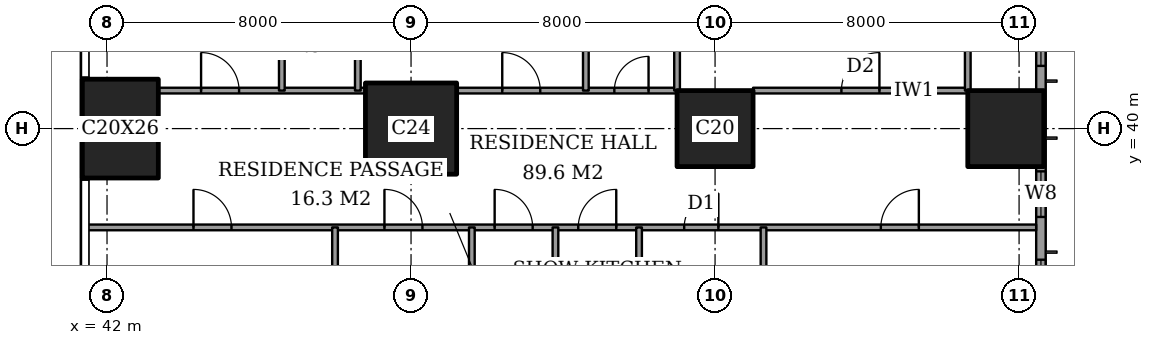
"""IFC4 building model, lengths in metres.
Left out: names, types, materials, properties, quantities, classifications, styles, units other than length and angle.
Written with IfcOpenShell. Run it as: python <this file> out.ifc"""

import sys

from ifc_helpers import new_model, si_unit, direction, frame, frame_2d, origin, origin_2d, place, context, subcontext, project, spatial, rectangle, extrude, element, fill, save


model = new_model("IFC4")
c1 = context("Model", 3, precision=1e-05, world=origin(), true_north=direction((0.0, 1.0)))
c2 = subcontext(c1, "Body", "Model", "MODEL_VIEW")
j1 = project(units=[si_unit("LENGTHUNIT", "METRE"), si_unit("PLANEANGLEUNIT", "RADIAN")], contexts=[c1])
p1 = place(None, origin())
s1 = spatial("IfcSite", under=j1, at=p1, CompositionType="ELEMENT")
p2 = place(p1, origin())
s2 = spatial("IfcBuilding", under=s1, at=p2, CompositionType="ELEMENT")
p3 = place(p2, frame((0.0, 0.0, 40.4)))
s3 = spatial("IfcBuildingStorey", under=s2, at=p3, CompositionType="ELEMENT", Elevation=40.4)
p4 = place(p3, frame((42.35, 40.0, 0.0), z_axis=(0.0, 0.0, 1.0), x_axis=(1.0, 0.0, 0.0)))
e1 = element("IfcColumn", 1, at=p4, inside=s3, PredefinedType="COLUMN", context=c2, shape_type="SweptSolid", body=[
    extrude(rectangle(XDim=2.0, YDim=2.6, at=origin_2d()), origin(), (0.0, 0.0, 1.0), 3.6),
])
p5 = place(p3, frame((50.0, 40.0, 0.0), z_axis=(0.0, 0.0, 1.0), x_axis=(1.0, 0.0, 0.0)))
e2 = element("IfcColumn", 2, at=p5, inside=s3, PredefinedType="COLUMN", context=c2, shape_type="SweptSolid", body=[
    extrude(rectangle(XDim=2.4, YDim=2.4, at=origin_2d()), origin(), (0.0, 0.0, 1.0), 3.6),
])
for number, where, z_axis, x_axis in (
    (3, (58.0, 40.0, 0.0), (0.0, 0.0, 1.0), (1.0, 0.0, 0.0)),
    (4, (65.65, 40.0, 0.0), (0.0, 0.0, 1.0), (1.0, 0.0, 0.0)),
):
    element("IfcColumn", number, at=place(p3, frame(where, z_axis=z_axis, x_axis=x_axis)), inside=s3, PredefinedType="COLUMN", context=c2, shape_type="SweptSolid", body=[
        extrude(rectangle(XDim=2.0, YDim=2.0, at=origin_2d()), origin(), (0.0, 0.0, 1.0), 3.6),
    ])
p6 = place(p3, frame((66.575, 3.175, 0.0), z_axis=(0.0, 0.0, 1.0), x_axis=(0.0, 1.0, 0.0)))
e5 = element("IfcWall", 5, at=p6, inside=s3, PredefinedType="SOLIDWALL", context=c2, shape_type="SweptSolid", body=[
    extrude(rectangle(XDim=41.65, YDim=0.25, at=frame_2d((20.825, 0.0))), origin(), (0.0, 0.0, 1.0), 3.6),
])
p7 = place(p6, frame((0.775, 0.0, 0.6)))
e6 = element("IfcOpeningElement", 6, at=p7, cuts=e5, PredefinedType="OPENING", context=c2, shape_type="SweptSolid", body=[
    extrude(rectangle(XDim=2.4, YDim=2.0, at=frame_2d((1.2, 1.0))), frame((0.0, 0.135, 0.0), z_axis=(0.0, -1.0, 0.0), x_axis=(1.0, 0.0, 0.0)), (0.0, 0.0, 1.0), 0.27),
])
p8 = place(p6, frame((6.1, 0.0, 0.6)))
e7 = element("IfcOpeningElement", 7, at=p8, cuts=e5, PredefinedType="OPENING", context=c2, shape_type="SweptSolid", body=[
    extrude(rectangle(XDim=1.2, YDim=2.0, at=frame_2d((0.6, 1.0))), frame((0.0, 0.135, 0.0), z_axis=(0.0, -1.0, 0.0), x_axis=(1.0, 0.0, 0.0)), (0.0, 0.0, 1.0), 0.27),
])
p9 = place(p6, frame((8.275, 0.0, 0.6)))
e8 = element("IfcOpeningElement", 8, at=p9, cuts=e5, PredefinedType="OPENING", context=c2, shape_type="SweptSolid", body=[
    extrude(rectangle(XDim=2.4, YDim=2.0, at=frame_2d((1.2, 1.0))), frame((0.0, 0.135, 0.0), z_axis=(0.0, -1.0, 0.0), x_axis=(1.0, 0.0, 0.0)), (0.0, 0.0, 1.0), 0.27),
])
p10 = place(p6, frame((15.775, 0.0, 0.6)))
e9 = element("IfcOpeningElement", 9, at=p10, cuts=e5, PredefinedType="OPENING", context=c2, shape_type="SweptSolid", body=[
    extrude(rectangle(XDim=2.4, YDim=2.0, at=frame_2d((1.2, 1.0))), frame((0.0, 0.135, 0.0), z_axis=(0.0, -1.0, 0.0), x_axis=(1.0, 0.0, 0.0)), (0.0, 0.0, 1.0), 0.27),
])
p11 = place(p6, frame((23.475, 0.0, 0.6)))
e10 = element("IfcOpeningElement", 10, at=p11, cuts=e5, PredefinedType="OPENING", context=c2, shape_type="SweptSolid", body=[
    extrude(rectangle(XDim=2.4, YDim=2.0, at=frame_2d((1.2, 1.0))), frame((0.0, 0.135, 0.0), z_axis=(0.0, -1.0, 0.0), x_axis=(1.0, 0.0, 0.0)), (0.0, 0.0, 1.0), 0.27),
])
p12 = place(p6, frame((30.975, 0.0, 0.6)))
e11 = element("IfcOpeningElement", 11, at=p12, cuts=e5, PredefinedType="OPENING", context=c2, shape_type="SweptSolid", body=[
    extrude(rectangle(XDim=2.4, YDim=2.0, at=frame_2d((1.2, 1.0))), frame((0.0, 0.135, 0.0), z_axis=(0.0, -1.0, 0.0), x_axis=(1.0, 0.0, 0.0)), (0.0, 0.0, 1.0), 0.27),
])
p13 = place(p6, frame((34.5, 0.0, 0.6)))
e12 = element("IfcOpeningElement", 12, at=p13, cuts=e5, PredefinedType="OPENING", context=c2, shape_type="SweptSolid", body=[
    extrude(rectangle(XDim=1.2, YDim=2.0, at=frame_2d((0.6, 1.0))), frame((0.0, 0.135, 0.0), z_axis=(0.0, -1.0, 0.0), x_axis=(1.0, 0.0, 0.0)), (0.0, 0.0, 1.0), 0.27),
])
p14 = place(p6, frame((38.475, 0.0, 0.6)))
e13 = element("IfcOpeningElement", 13, at=p14, cuts=e5, PredefinedType="OPENING", context=c2, shape_type="SweptSolid", body=[
    extrude(rectangle(XDim=2.4, YDim=2.0, at=frame_2d((1.2, 1.0))), frame((0.0, 0.135, 0.0), z_axis=(0.0, -1.0, 0.0), x_axis=(1.0, 0.0, 0.0)), (0.0, 0.0, 1.0), 0.27),
])
p15 = place(p3, frame((41.439, 37.4, 0.0), z_axis=(0.0, 0.0, 1.0), x_axis=(1.0, 0.0, 0.0)))
e14 = element("IfcWall", 14, at=p15, inside=s3, PredefinedType="PARTITIONING", context=c2, shape_type="SweptSolid", body=[
    extrude(rectangle(XDim=25.011, YDim=0.15, at=frame_2d((12.505, 0.0))), origin(), (0.0, 0.0, 1.0), 3.35),
])
p16 = place(p15, frame((10.761, 0.0, 0.0)))
e15 = element("IfcOpeningElement", 15, at=p16, cuts=e14, PredefinedType="OPENING", context=c2, shape_type="SweptSolid", body=[
    extrude(rectangle(XDim=1.0, YDim=2.1, at=frame_2d((0.5, 1.05))), frame((0.0, 0.085, 0.0), z_axis=(0.0, -1.0, 0.0), x_axis=(1.0, 0.0, 0.0)), (0.0, 0.0, 1.0), 0.17),
])
p17 = place(p15, frame((20.924, 0.0, 0.0)))
e16 = element("IfcOpeningElement", 16, at=p17, cuts=e14, PredefinedType="OPENING", context=c2, shape_type="SweptSolid", body=[
    extrude(rectangle(XDim=1.0, YDim=2.1, at=frame_2d((0.5, 1.05))), frame((0.0, 0.085, 0.0), z_axis=(0.0, -1.0, 0.0), x_axis=(1.0, 0.0, 0.0)), (0.0, 0.0, 1.0), 0.17),
])
p18 = place(p15, frame((15.749, 0.0, 0.0)))
e17 = element("IfcOpeningElement", 17, at=p18, cuts=e14, PredefinedType="OPENING", context=c2, shape_type="SweptSolid", body=[
    extrude(rectangle(XDim=0.9, YDim=2.1, at=frame_2d((0.45, 1.05))), frame((0.0, 0.085, 0.0), z_axis=(0.0, -1.0, 0.0), x_axis=(1.0, 0.0, 0.0)), (0.0, 0.0, 1.0), 0.17),
])
p19 = place(p15, frame((12.961, 0.0, 0.0)))
e18 = element("IfcOpeningElement", 18, at=p19, cuts=e14, PredefinedType="OPENING", context=c2, shape_type="SweptSolid", body=[
    extrude(rectangle(XDim=1.0, YDim=2.1, at=frame_2d((0.5, 1.05))), frame((0.0, 0.085, 0.0), z_axis=(0.0, -1.0, 0.0), x_axis=(1.0, 0.0, 0.0)), (0.0, 0.0, 1.0), 0.17),
])
p20 = place(p15, frame((7.861, 0.0, 0.0)))
e19 = element("IfcOpeningElement", 19, at=p20, cuts=e14, PredefinedType="OPENING", context=c2, shape_type="SweptSolid", body=[
    extrude(rectangle(XDim=1.0, YDim=2.1, at=frame_2d((0.5, 1.05))), frame((0.0, 0.085, 0.0), z_axis=(0.0, -1.0, 0.0), x_axis=(1.0, 0.0, 0.0)), (0.0, 0.0, 1.0), 0.17),
])
p21 = place(p15, frame((2.836, 0.0, 0.0)))
e20 = element("IfcOpeningElement", 20, at=p21, cuts=e14, PredefinedType="OPENING", context=c2, shape_type="SweptSolid", body=[
    extrude(rectangle(XDim=1.0, YDim=2.1, at=frame_2d((0.5, 1.05))), frame((0.0, 0.085, 0.0), z_axis=(0.0, -1.0, 0.0), x_axis=(1.0, 0.0, 0.0)), (0.0, 0.0, 1.0), 0.17),
])
p22 = place(p3, frame((43.35, 41.0, 0.0), z_axis=(0.0, 0.0, 1.0), x_axis=(1.0, 0.0, 0.0)))
e21 = element("IfcWall", 21, at=p22, inside=s3, PredefinedType="PARTITIONING", context=c2, shape_type="SweptSolid", body=[
    extrude(rectangle(XDim=5.45, YDim=0.15, at=frame_2d((2.725, 0.0))), origin(), (0.0, 0.0, 1.0), 3.35),
])
p23 = place(p22, frame((1.125, 0.0, 0.0)))
e22 = element("IfcOpeningElement", 22, at=p23, cuts=e21, PredefinedType="OPENING", context=c2, shape_type="SweptSolid", body=[
    extrude(rectangle(XDim=1.0, YDim=2.1, at=frame_2d((0.5, 1.05))), frame((0.0, 0.085, 0.0), z_axis=(0.0, -1.0, 0.0), x_axis=(1.0, 0.0, 0.0)), (0.0, 0.0, 1.0), 0.17),
])
p24 = place(p3, frame((51.2, 41.0, 0.0), z_axis=(0.0, 0.0, 1.0), x_axis=(1.0, 0.0, 0.0)))
e23 = element("IfcWall", 23, at=p24, inside=s3, PredefinedType="PARTITIONING", context=c2, shape_type="SweptSolid", body=[
    extrude(rectangle(XDim=5.8, YDim=0.15, at=frame_2d((2.9, 0.0))), origin(), (0.0, 0.0, 1.0), 3.35),
])
p25 = place(p24, frame((4.15, 0.0, 0.0)))
e24 = element("IfcOpeningElement", 24, at=p25, cuts=e23, PredefinedType="OPENING", context=c2, shape_type="SweptSolid", body=[
    extrude(rectangle(XDim=0.9, YDim=2.1, at=frame_2d((0.45, 1.05))), frame((0.0, 0.085, 0.0), z_axis=(0.0, -1.0, 0.0), x_axis=(1.0, 0.0, 0.0)), (0.0, 0.0, 1.0), 0.17),
])
p26 = place(p24, frame((1.2, 0.0, 0.0)))
e25 = element("IfcOpeningElement", 25, at=p26, cuts=e23, PredefinedType="OPENING", context=c2, shape_type="SweptSolid", body=[
    extrude(rectangle(XDim=1.0, YDim=2.1, at=frame_2d((0.5, 1.05))), frame((0.0, 0.085, 0.0), z_axis=(0.0, -1.0, 0.0), x_axis=(1.0, 0.0, 0.0)), (0.0, 0.0, 1.0), 0.17),
])
p27 = place(p3, frame((59.0, 41.0, 0.0), z_axis=(0.0, 0.0, 1.0), x_axis=(1.0, 0.0, 0.0)))
e26 = element("IfcWall", 26, at=p27, inside=s3, PredefinedType="PARTITIONING", context=c2, shape_type="SweptSolid", body=[
    extrude(rectangle(XDim=5.65, YDim=0.15, at=frame_2d((2.825, 0.0))), origin(), (0.0, 0.0, 1.0), 3.35),
])
p28 = place(p27, frame((2.325, 0.0, 0.0)))
e27 = element("IfcOpeningElement", 27, at=p28, cuts=e26, PredefinedType="OPENING", context=c2, shape_type="SweptSolid", body=[
    extrude(rectangle(XDim=1.0, YDim=2.1, at=frame_2d((0.5, 1.05))), frame((0.0, 0.085, 0.0), z_axis=(0.0, -1.0, 0.0), x_axis=(1.0, 0.0, 0.0)), (0.0, 0.0, 1.0), 0.17),
])
p29 = place(p3, frame((46.6, 41.0, 0.0), z_axis=(0.0, 0.0, 1.0), x_axis=(0.0, 1.0, 0.0)))
e28 = element("IfcWall", 28, at=p29, inside=s3, PredefinedType="PARTITIONING", context=c2, shape_type="SweptSolid", body=[
    extrude(rectangle(XDim=7.45, YDim=0.15, at=frame_2d((3.725, 0.0))), origin(), (0.0, 0.0, 1.0), 3.35),
])
p30 = place(p29, frame((3.275, 0.0, 0.0)))
e29 = element("IfcOpeningElement", 29, at=p30, cuts=e28, PredefinedType="OPENING", context=c2, shape_type="SweptSolid", body=[
    extrude(rectangle(XDim=0.9, YDim=2.1, at=frame_2d((0.45, 1.05))), frame((0.0, 0.085, 0.0), z_axis=(0.0, -1.0, 0.0), x_axis=(1.0, 0.0, 0.0)), (0.0, 0.0, 1.0), 0.17),
])
p31 = place(p3, frame((48.0, 28.0, 0.0), z_axis=(0.0, 0.0, 1.0), x_axis=(0.0, 1.0, 0.0)))
e30 = element("IfcWall", 30, at=p31, inside=s3, PredefinedType="PARTITIONING", context=c2, shape_type="SweptSolid", body=[
    extrude(rectangle(XDim=9.4, YDim=0.15, at=frame_2d((4.7, 0.0))), origin(), (0.0, 0.0, 1.0), 3.35),
])
p32 = place(p31, frame((0.55, 0.0, 0.0)))
e31 = element("IfcOpeningElement", 31, at=p32, cuts=e30, PredefinedType="OPENING", context=c2, shape_type="SweptSolid", body=[
    extrude(rectangle(XDim=0.9, YDim=2.1, at=frame_2d((0.45, 1.05))), frame((0.0, 0.085, 0.0), z_axis=(0.0, -1.0, 0.0), x_axis=(1.0, 0.0, 0.0)), (0.0, 0.0, 1.0), 0.17),
])
p33 = place(p3, frame((48.6, 41.0, 0.0), z_axis=(0.0, 0.0, 1.0), x_axis=(0.0, 1.0, 0.0)))
e32 = element("IfcWall", 32, at=p33, inside=s3, PredefinedType="PARTITIONING", context=c2, shape_type="SweptSolid", body=[
    extrude(rectangle(XDim=7.45, YDim=0.15, at=frame_2d((3.725, 0.0))), origin(), (0.0, 0.0, 1.0), 3.35),
])
for number, where, z_axis, x_axis in (
    (33, (51.6, 30.0, 0.0), (0.0, 0.0, 1.0), (0.0, 1.0, 0.0)),
    (34, (53.8, 30.0, 0.0), (0.0, 0.0, 1.0), (0.0, 1.0, 0.0)),
):
    element("IfcWall", number, at=place(p3, frame(where, z_axis=z_axis, x_axis=x_axis)), inside=s3, PredefinedType="PARTITIONING", context=c2, shape_type="SweptSolid", body=[
        extrude(rectangle(XDim=7.4, YDim=0.15, at=frame_2d((3.7, 0.0))), origin(), (0.0, 0.0, 1.0), 3.35),
    ])
p34 = place(p3, frame((54.6, 41.0, 0.0), z_axis=(0.0, 0.0, 1.0), x_axis=(0.0, 1.0, 0.0)))
e35 = element("IfcWall", 35, at=p34, inside=s3, PredefinedType="PARTITIONING", context=c2, shape_type="SweptSolid", body=[
    extrude(rectangle(XDim=7.45, YDim=0.15, at=frame_2d((3.725, 0.0))), origin(), (0.0, 0.0, 1.0), 3.35),
])
p35 = place(p3, frame((56.0, 28.0, 0.0), z_axis=(0.0, 0.0, 1.0), x_axis=(0.0, 1.0, 0.0)))
e36 = element("IfcWall", 36, at=p35, inside=s3, PredefinedType="PARTITIONING", context=c2, shape_type="SweptSolid", body=[
    extrude(rectangle(XDim=9.4, YDim=0.15, at=frame_2d((4.7, 0.0))), origin(), (0.0, 0.0, 1.0), 3.35),
])
p36 = place(p35, frame((0.5, 0.0, 0.0)))
e37 = element("IfcOpeningElement", 37, at=p36, cuts=e36, PredefinedType="OPENING", context=c2, shape_type="SweptSolid", body=[
    extrude(rectangle(XDim=1.0, YDim=2.1, at=frame_2d((0.5, 1.05))), frame((0.0, 0.085, 0.0), z_axis=(0.0, -1.0, 0.0), x_axis=(1.0, 0.0, 0.0)), (0.0, 0.0, 1.0), 0.17),
])
p37 = place(p3, frame((57.0, 41.0, 0.0), z_axis=(0.0, 0.0, 1.0), x_axis=(0.0, 1.0, 0.0)))
e38 = element("IfcWall", 38, at=p37, inside=s3, PredefinedType="PARTITIONING", context=c2, shape_type="SweptSolid", body=[
    extrude(rectangle(XDim=5.65, YDim=0.15, at=frame_2d((2.825, 0.0))), origin(), (0.0, 0.0, 1.0), 3.35),
])
p38 = place(p3, frame((59.275, 33.2, 0.0), z_axis=(0.0, 0.0, 1.0), x_axis=(0.0, 1.0, 0.0)))
e39 = element("IfcWall", 39, at=p38, inside=s3, PredefinedType="PARTITIONING", context=c2, shape_type="SweptSolid", body=[
    extrude(rectangle(XDim=4.2, YDim=0.15, at=frame_2d((2.1, 0.0))), origin(), (0.0, 0.0, 1.0), 3.35),
])
p39 = place(p3, frame((64.65, 41.0, 0.0), z_axis=(0.0, 0.0, 1.0), x_axis=(0.0, 1.0, 0.0)))
e40 = element("IfcWall", 40, at=p39, inside=s3, PredefinedType="PARTITIONING", context=c2, shape_type="SweptSolid", body=[
    extrude(rectangle(XDim=3.7, YDim=0.15, at=frame_2d((1.85, 0.0))), origin(), (0.0, 0.0, 1.0), 3.35),
])
p40 = place(p39, frame((1.4, 0.0, 0.0)))
e41 = element("IfcOpeningElement", 41, at=p40, cuts=e40, PredefinedType="OPENING", context=c2, shape_type="SweptSolid", body=[
    extrude(rectangle(XDim=0.9, YDim=2.1, at=frame_2d((0.45, 1.05))), frame((0.0, 0.085, 0.0), z_axis=(0.0, -1.0, 0.0), x_axis=(1.0, 0.0, 0.0)), (0.0, 0.0, 1.0), 0.17),
])
p41 = place(p12, origin())
e42 = element("IfcWindow", 42, at=p41, inside=s3, PartitioningType="SINGLE_PANEL", PredefinedType="WINDOW", context=c2, shape_type="SweptSolid", body=[
    extrude(rectangle(XDim=2.4, YDim=2.0, at=frame_2d((1.2, 1.0))), frame((0.0, 0.03, 0.0), z_axis=(0.0, -1.0, 0.0), x_axis=(1.0, 0.0, 0.0)), (0.0, 0.0, 1.0), 0.06),
])
fill(e11, e42)
p42 = place(p13, origin())
e43 = element("IfcWindow", 43, at=p42, inside=s3, PartitioningType="SINGLE_PANEL", PredefinedType="WINDOW", context=c2, shape_type="SweptSolid", body=[
    extrude(rectangle(XDim=1.2, YDim=2.0, at=frame_2d((0.6, 1.0))), frame((0.0, 0.03, 0.0), z_axis=(0.0, -1.0, 0.0), x_axis=(1.0, 0.0, 0.0)), (0.0, 0.0, 1.0), 0.06),
])
fill(e12, e43)
p43 = place(p14, origin())
e44 = element("IfcWindow", 44, at=p43, inside=s3, PartitioningType="SINGLE_PANEL", PredefinedType="WINDOW", context=c2, shape_type="SweptSolid", body=[
    extrude(rectangle(XDim=2.4, YDim=2.0, at=frame_2d((1.2, 1.0))), frame((0.0, 0.03, 0.0), z_axis=(0.0, -1.0, 0.0), x_axis=(1.0, 0.0, 0.0)), (0.0, 0.0, 1.0), 0.06),
])
fill(e13, e44)
p44 = place(p28, origin())
e45 = element("IfcDoor", 45, at=p44, inside=s3, OperationType="SINGLE_SWING_LEFT", PredefinedType="DOOR", context=c2, shape_type="SweptSolid", body=[
    extrude(rectangle(XDim=1.0, YDim=2.1, at=frame_2d((0.5, 1.05))), frame((0.0, 0.025, 0.0), z_axis=(0.0, -1.0, 0.0), x_axis=(1.0, 0.0, 0.0)), (0.0, 0.0, 1.0), 0.05),
])
fill(e27, e45)
p45 = place(p25, origin())
e46 = element("IfcDoor", 46, at=p45, inside=s3, OperationType="SINGLE_SWING_LEFT", PredefinedType="DOOR", context=c2, shape_type="SweptSolid", body=[
    extrude(rectangle(XDim=0.9, YDim=2.1, at=frame_2d((0.45, 1.05))), frame((0.0, 0.025, 0.0), z_axis=(0.0, -1.0, 0.0), x_axis=(1.0, 0.0, 0.0)), (0.0, 0.0, 1.0), 0.05),
])
fill(e24, e46)
p46 = place(p26, origin())
e47 = element("IfcDoor", 47, at=p46, inside=s3, OperationType="SINGLE_SWING_RIGHT", PredefinedType="DOOR", context=c2, shape_type="SweptSolid", body=[
    extrude(rectangle(XDim=1.0, YDim=2.1, at=frame_2d((0.5, 1.05))), frame((0.0, 0.025, 0.0), z_axis=(0.0, -1.0, 0.0), x_axis=(1.0, 0.0, 0.0)), (0.0, 0.0, 1.0), 0.05),
])
fill(e25, e47)
p47 = place(p23, origin())
e48 = element("IfcDoor", 48, at=p47, inside=s3, OperationType="SINGLE_SWING_RIGHT", PredefinedType="DOOR", context=c2, shape_type="SweptSolid", body=[
    extrude(rectangle(XDim=1.0, YDim=2.1, at=frame_2d((0.5, 1.05))), frame((0.0, 0.025, 0.0), z_axis=(0.0, -1.0, 0.0), x_axis=(1.0, 0.0, 0.0)), (0.0, 0.0, 1.0), 0.05),
])
fill(e22, e48)
p48 = place(p16, origin())
e49 = element("IfcDoor", 49, at=p48, inside=s3, OperationType="SINGLE_SWING_RIGHT", PredefinedType="DOOR", context=c2, shape_type="SweptSolid", body=[
    extrude(rectangle(XDim=1.0, YDim=2.1, at=frame_2d((0.5, 1.05))), frame((0.0, 0.025, 0.0), z_axis=(0.0, -1.0, 0.0), x_axis=(1.0, 0.0, 0.0)), (0.0, 0.0, 1.0), 0.05),
])
fill(e15, e49)
p49 = place(p17, origin())
e50 = element("IfcDoor", 50, at=p49, inside=s3, OperationType="SINGLE_SWING_LEFT", PredefinedType="DOOR", context=c2, shape_type="SweptSolid", body=[
    extrude(rectangle(XDim=1.0, YDim=2.1, at=frame_2d((0.5, 1.05))), frame((0.0, 0.025, 0.0), z_axis=(0.0, -1.0, 0.0), x_axis=(1.0, 0.0, 0.0)), (0.0, 0.0, 1.0), 0.05),
])
fill(e16, e50)
p50 = place(p18, origin())
e51 = element("IfcDoor", 51, at=p50, inside=s3, OperationType="SINGLE_SWING_LEFT", PredefinedType="DOOR", context=c2, shape_type="SweptSolid", body=[
    extrude(rectangle(XDim=0.9, YDim=2.1, at=frame_2d((0.45, 1.05))), frame((0.0, 0.025, 0.0), z_axis=(0.0, -1.0, 0.0), x_axis=(1.0, 0.0, 0.0)), (0.0, 0.0, 1.0), 0.05),
])
fill(e17, e51)
p51 = place(p19, origin())
e52 = element("IfcDoor", 52, at=p51, inside=s3, OperationType="SINGLE_SWING_LEFT", PredefinedType="DOOR", context=c2, shape_type="SweptSolid", body=[
    extrude(rectangle(XDim=1.0, YDim=2.1, at=frame_2d((0.5, 1.05))), frame((0.0, 0.025, 0.0), z_axis=(0.0, -1.0, 0.0), x_axis=(1.0, 0.0, 0.0)), (0.0, 0.0, 1.0), 0.05),
])
fill(e18, e52)
p52 = place(p20, origin())
e53 = element("IfcDoor", 53, at=p52, inside=s3, OperationType="SINGLE_SWING_RIGHT", PredefinedType="DOOR", context=c2, shape_type="SweptSolid", body=[
    extrude(rectangle(XDim=1.0, YDim=2.1, at=frame_2d((0.5, 1.05))), frame((0.0, 0.025, 0.0), z_axis=(0.0, -1.0, 0.0), x_axis=(1.0, 0.0, 0.0)), (0.0, 0.0, 1.0), 0.05),
])
fill(e19, e53)
p53 = place(p21, origin())
e54 = element("IfcDoor", 54, at=p53, inside=s3, OperationType="SINGLE_SWING_RIGHT", PredefinedType="DOOR", context=c2, shape_type="SweptSolid", body=[
    extrude(rectangle(XDim=1.0, YDim=2.1, at=frame_2d((0.5, 1.05))), frame((0.0, 0.025, 0.0), z_axis=(0.0, -1.0, 0.0), x_axis=(1.0, 0.0, 0.0)), (0.0, 0.0, 1.0), 0.05),
])
fill(e20, e54)
save(model, sys.argv[1])
